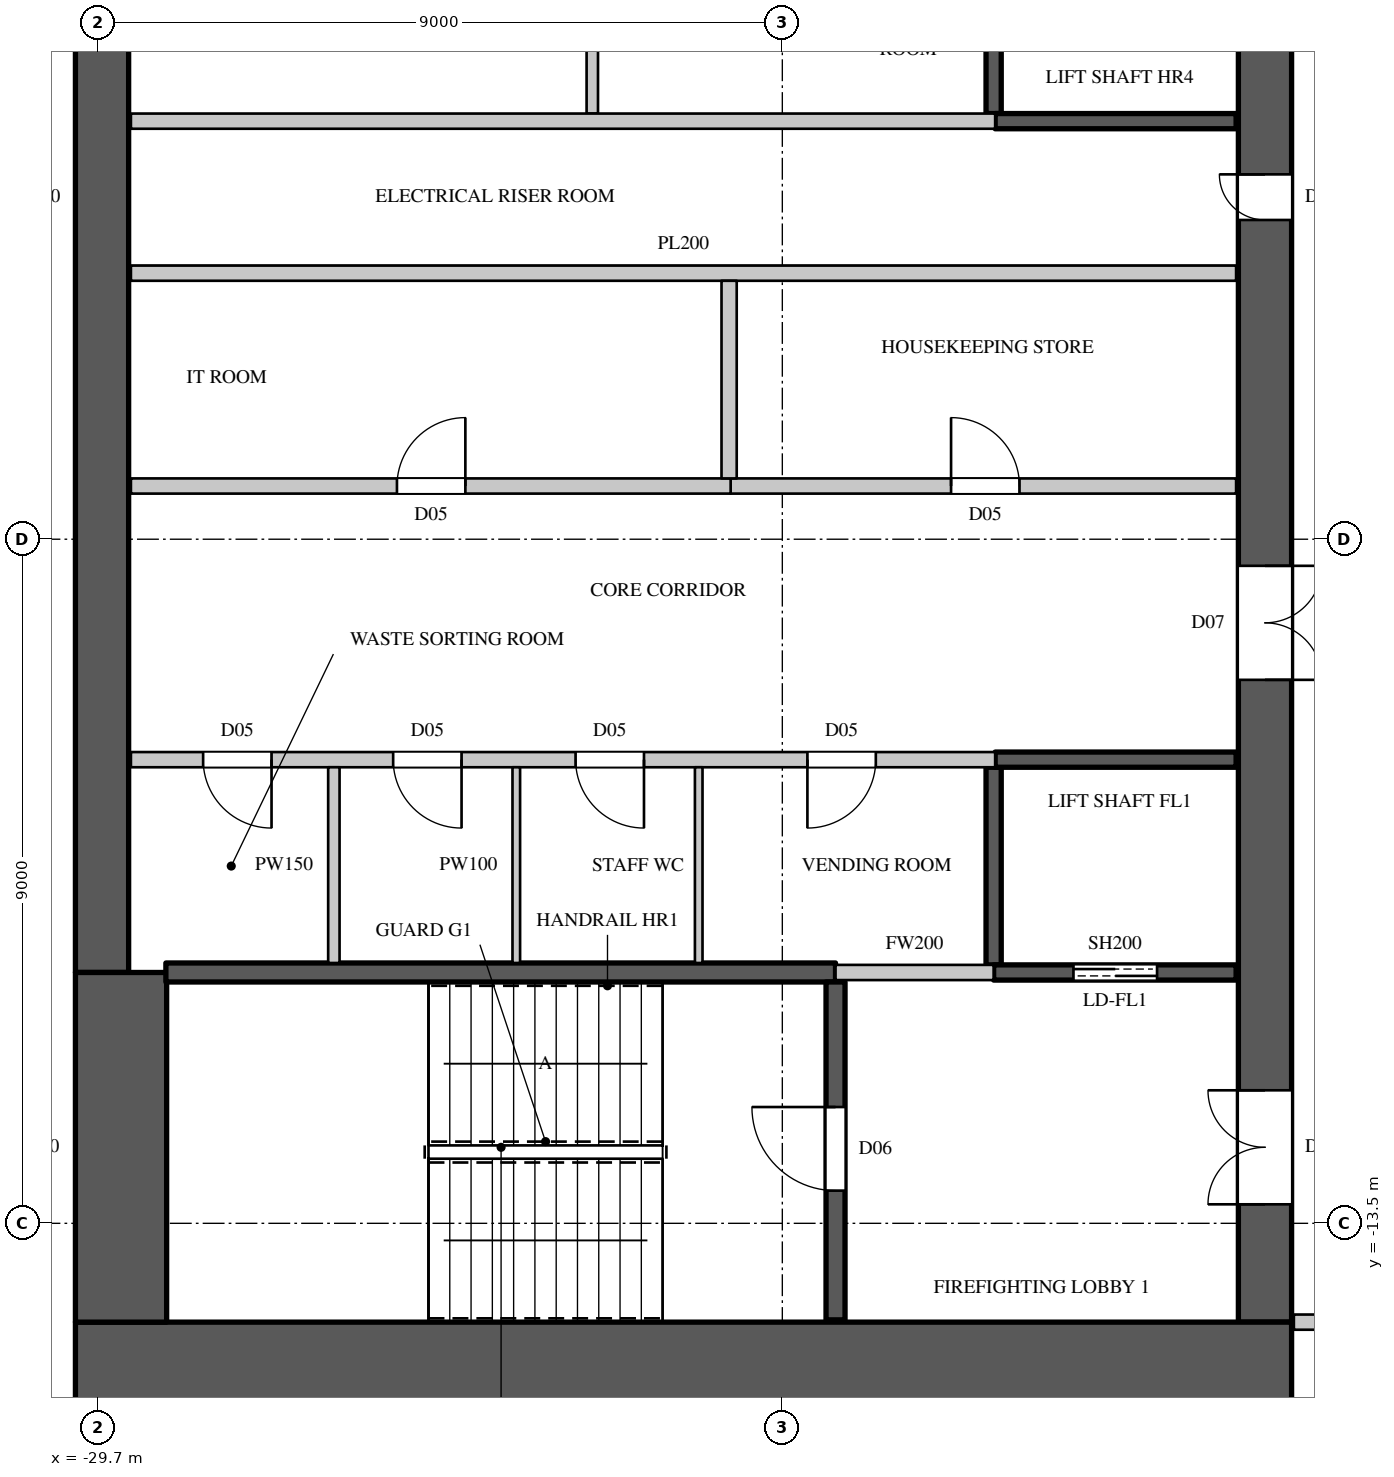
"""IFC4 building model, lengths in metres.
Left out: names, types, materials, properties, quantities, classifications, styles, units other than length and angle.
Written with IfcOpenShell. Run it as: python <this file> out.ifc"""

import sys

from ifc_helpers import new_model, si_unit, direction, frame, frame_2d, origin, place, context, subcontext, project, spatial, rectangle, extrude, element, fill, save


model = new_model("IFC4")
c1 = context("Model", 3, precision=1e-05, world=origin(), true_north=direction((0.0, 1.0)))
c2 = subcontext(c1, "Body", "Model", "MODEL_VIEW")
j1 = project(units=[si_unit("LENGTHUNIT", "METRE"), si_unit("PLANEANGLEUNIT", "RADIAN")], contexts=[c1])
p1 = place(None, origin())
s1 = spatial("IfcSite", under=j1, at=p1, CompositionType="ELEMENT")
p2 = place(p1, origin())
s2 = spatial("IfcBuilding", under=s1, at=p2, CompositionType="ELEMENT")
p3 = place(p2, frame((0.0, 0.0, 247.5)))
s3 = spatial("IfcBuildingStorey", under=s2, at=p3, CompositionType="ELEMENT", Elevation=247.5)
p4 = place(p3, frame((-30.0, -15.4, 0.0), z_axis=(0.0, 0.0, 1.0), x_axis=(1.0, 0.0, 0.0)))
e1 = element("IfcWall", 1, at=p4, inside=s3, PredefinedType="SHEAR", context=c2, shape_type="SweptSolid", body=[
    extrude(rectangle(XDim=16.0, YDim=1.2, at=frame_2d((8.0, 0.0))), origin(), (0.0, 0.0, 1.0), 4.1),
])
p5 = place(p3, frame((-14.35, -14.8, 0.0), z_axis=(0.0, 0.0, 1.0), x_axis=(0.0, 1.0, 0.0)))
e2 = element("IfcWall", 2, at=p5, inside=s3, PredefinedType="SHEAR", context=c2, shape_type="SweptSolid", body=[
    extrude(rectangle(XDim=29.6, YDim=0.7, at=frame_2d((14.8, 0.0))), origin(), (0.0, 0.0, 1.0), 4.1),
])
p6 = place(p5, frame((1.55, 0.0, 0.0)))
e3 = element("IfcOpeningElement", 3, at=p6, cuts=e2, PredefinedType="OPENING", context=c2, shape_type="SweptSolid", body=[
    extrude(rectangle(XDim=1.5, YDim=2.4, at=frame_2d((0.75, 1.2))), frame((0.0, 0.36, 0.0), z_axis=(0.0, -1.0, 0.0), x_axis=(1.0, 0.0, 0.0)), (0.0, 0.0, 1.0), 0.72),
])
p7 = place(p5, frame((26.55, 0.0, 0.0)))
e4 = element("IfcOpeningElement", 4, at=p7, cuts=e2, PredefinedType="OPENING", context=c2, shape_type="SweptSolid", body=[
    extrude(rectangle(XDim=1.5, YDim=2.4, at=frame_2d((0.75, 1.2))), frame((0.0, 0.36, 0.0), z_axis=(0.0, -1.0, 0.0), x_axis=(1.0, 0.0, 0.0)), (0.0, 0.0, 1.0), 0.72),
])
p8 = place(p5, frame((8.45, 0.0, 0.0)))
e5 = element("IfcOpeningElement", 5, at=p8, cuts=e2, PredefinedType="OPENING", context=c2, shape_type="SweptSolid", body=[
    extrude(rectangle(XDim=1.5, YDim=2.4, at=frame_2d((0.75, 1.2))), frame((0.0, 0.36, 0.0), z_axis=(0.0, -1.0, 0.0), x_axis=(1.0, 0.0, 0.0)), (0.0, 0.0, 1.0), 0.72),
])
p9 = place(p5, frame((19.65, 0.0, 0.0)))
e6 = element("IfcOpeningElement", 6, at=p9, cuts=e2, PredefinedType="OPENING", context=c2, shape_type="SweptSolid", body=[
    extrude(rectangle(XDim=1.5, YDim=2.4, at=frame_2d((0.75, 1.2))), frame((0.0, 0.36, 0.0), z_axis=(0.0, -1.0, 0.0), x_axis=(1.0, 0.0, 0.0)), (0.0, 0.0, 1.0), 0.72),
])
p10 = place(p5, frame((14.5, 0.0, 0.0)))
e7 = element("IfcOpeningElement", 7, at=p10, cuts=e2, PredefinedType="OPENING", context=c2, shape_type="SweptSolid", body=[
    extrude(rectangle(XDim=0.6, YDim=2.0, at=frame_2d((0.3, 1.0))), frame((0.0, 0.36, 0.0), z_axis=(0.0, -1.0, 0.0), x_axis=(1.0, 0.0, 0.0)), (0.0, 0.0, 1.0), 0.72),
])
p11 = place(p3, frame((-29.65, -10.2, 0.0), z_axis=(0.0, 0.0, 1.0), x_axis=(0.0, 1.0, 0.0)))
e8 = element("IfcWall", 8, at=p11, inside=s3, PredefinedType="SHEAR", context=c2, shape_type="SweptSolid", body=[
    extrude(rectangle(XDim=20.4, YDim=0.7, at=frame_2d((10.2, 0.0))), origin(), (0.0, 0.0, 1.0), 4.1),
])
p12 = place(p3, frame((-29.4, -14.8, 0.0), z_axis=(0.0, 0.0, 1.0), x_axis=(0.0, 1.0, 0.0)))
e9 = element("IfcWall", 9, at=p12, inside=s3, PredefinedType="SHEAR", context=c2, shape_type="SweptSolid", body=[
    extrude(rectangle(XDim=4.6, YDim=1.2, at=frame_2d((2.3, 0.0))), origin(), (0.0, 0.0, 1.0), 4.1),
])
p13 = place(p3, frame((-29.27, -7.4, 0.0), z_axis=(0.0, 0.0, 1.0), x_axis=(1.0, 0.0, 0.0)))
e10 = element("IfcWall", 10, at=p13, inside=s3, PredefinedType="PARTITIONING", context=c2, shape_type="SweptSolid", body=[
    extrude(rectangle(XDim=11.37, YDim=0.2, at=frame_2d((5.685, 0.0))), origin(), (0.0, 0.0, 1.0), 3.8),
])
p14 = place(p13, frame((0.95, 0.0, 0.0)))
e11 = element("IfcOpeningElement", 11, at=p14, cuts=e10, PredefinedType="OPENING", context=c2, shape_type="SweptSolid", body=[
    extrude(rectangle(XDim=0.9, YDim=2.2, at=frame_2d((0.45, 1.1))), frame((0.0, 0.11, 0.0), z_axis=(0.0, -1.0, 0.0), x_axis=(1.0, 0.0, 0.0)), (0.0, 0.0, 1.0), 0.22),
])
p15 = place(p13, frame((3.45, 0.0, 0.0)))
e12 = element("IfcOpeningElement", 12, at=p15, cuts=e10, PredefinedType="OPENING", context=c2, shape_type="SweptSolid", body=[
    extrude(rectangle(XDim=0.9, YDim=2.2, at=frame_2d((0.45, 1.1))), frame((0.0, 0.11, 0.0), z_axis=(0.0, -1.0, 0.0), x_axis=(1.0, 0.0, 0.0)), (0.0, 0.0, 1.0), 0.22),
])
p16 = place(p13, frame((5.85, 0.0, 0.0)))
e13 = element("IfcOpeningElement", 13, at=p16, cuts=e10, PredefinedType="OPENING", context=c2, shape_type="SweptSolid", body=[
    extrude(rectangle(XDim=0.9, YDim=2.2, at=frame_2d((0.45, 1.1))), frame((0.0, 0.11, 0.0), z_axis=(0.0, -1.0, 0.0), x_axis=(1.0, 0.0, 0.0)), (0.0, 0.0, 1.0), 0.22),
])
p17 = place(p13, frame((8.9, 0.0, 0.0)))
e14 = element("IfcOpeningElement", 14, at=p17, cuts=e10, PredefinedType="OPENING", context=c2, shape_type="SweptSolid", body=[
    extrude(rectangle(XDim=0.9, YDim=2.2, at=frame_2d((0.45, 1.1))), frame((0.0, 0.11, 0.0), z_axis=(0.0, -1.0, 0.0), x_axis=(1.0, 0.0, 0.0)), (0.0, 0.0, 1.0), 0.22),
])
p18 = place(p3, frame((-21.38, -3.8, 0.0), z_axis=(0.0, 0.0, 1.0), x_axis=(1.0, 0.0, 0.0)))
e15 = element("IfcWall", 15, at=p18, inside=s3, PredefinedType="PARTITIONING", context=c2, shape_type="SweptSolid", body=[
    extrude(rectangle(XDim=6.65, YDim=0.2, at=frame_2d((3.325, 0.0))), origin(), (0.0, 0.0, 1.0), 3.8),
])
p19 = place(p18, frame((2.9, 0.0, 0.0)))
e16 = element("IfcOpeningElement", 16, at=p19, cuts=e15, PredefinedType="OPENING", context=c2, shape_type="SweptSolid", body=[
    extrude(rectangle(XDim=0.9, YDim=2.2, at=frame_2d((0.45, 1.1))), frame((0.0, 0.11, 0.0), z_axis=(0.0, -1.0, 0.0), x_axis=(1.0, 0.0, 0.0)), (0.0, 0.0, 1.0), 0.22),
])
p20 = place(p3, frame((-20.0, -10.2, 0.0), z_axis=(0.0, 0.0, 1.0), x_axis=(1.0, 0.0, 0.0)))
e17 = element("IfcWall", 17, at=p20, inside=s3, PredefinedType="PARTITIONING", context=c2, shape_type="SweptSolid", body=[
    extrude(rectangle(XDim=2.08, YDim=0.2, at=frame_2d((1.04, 0.0))), origin(), (0.0, 0.0, 1.0), 3.8),
])
p21 = place(p3, frame((-13.97, -14.8, 0.0), z_axis=(0.0, 0.0, 1.0), x_axis=(1.0, 0.0, 0.0)))
e18 = element("IfcWall", 18, at=p21, inside=s3, PredefinedType="PARTITIONING", context=c2, shape_type="SweptSolid", body=[
    extrude(rectangle(XDim=2.87, YDim=0.2, at=frame_2d((1.435, 0.0))), origin(), (0.0, 0.0, 1.0), 3.8),
])
p22 = place(p3, frame((-26.6, -10.075, 0.0), z_axis=(0.0, 0.0, 1.0), x_axis=(0.0, 1.0, 0.0)))
e19 = element("IfcWall", 19, at=p22, inside=s3, PredefinedType="PARTITIONING", context=c2, shape_type="SweptSolid", body=[
    extrude(rectangle(XDim=2.575, YDim=0.15, at=frame_2d((1.288, 0.0))), origin(), (0.0, 0.0, 1.0), 3.8),
])
p23 = place(p3, frame((-23.2, 1.1, 0.0), z_axis=(0.0, 0.0, 1.0), x_axis=(0.0, 1.0, 0.0)))
e20 = element("IfcWall", 20, at=p23, inside=s3, PredefinedType="PARTITIONING", context=c2, shape_type="SweptSolid", body=[
    extrude(rectangle(XDim=2.6, YDim=0.15, at=frame_2d((1.3, 0.0))), origin(), (0.0, 0.0, 1.0), 3.8),
])
p24 = place(p3, frame((-29.27, -3.8, 0.0), z_axis=(0.0, 0.0, 1.0), x_axis=(1.0, 0.0, 0.0)))
e21 = element("IfcWall", 21, at=p24, inside=s3, PredefinedType="PARTITIONING", context=c2, shape_type="SweptSolid", body=[
    extrude(rectangle(XDim=7.89, YDim=0.2, at=frame_2d((3.945, 0.0))), origin(), (0.0, 0.0, 1.0), 3.8),
])
p25 = place(p24, frame((3.5, 0.0, 0.0)))
e22 = element("IfcOpeningElement", 22, at=p25, cuts=e21, PredefinedType="OPENING", context=c2, shape_type="SweptSolid", body=[
    extrude(rectangle(XDim=0.9, YDim=2.2, at=frame_2d((0.45, 1.1))), frame((0.0, 0.11, 0.0), z_axis=(0.0, -1.0, 0.0), x_axis=(1.0, 0.0, 0.0)), (0.0, 0.0, 1.0), 0.22),
])
p26 = place(p3, frame((-29.27, -1.0, 0.0), z_axis=(0.0, 0.0, 1.0), x_axis=(1.0, 0.0, 0.0)))
e23 = element("IfcWall", 23, at=p26, inside=s3, PredefinedType="PARTITIONING", context=c2, shape_type="SweptSolid", body=[
    extrude(rectangle(XDim=14.54, YDim=0.2, at=frame_2d((7.27, 0.0))), origin(), (0.0, 0.0, 1.0), 3.8),
])
p27 = place(p3, frame((-29.27, 1.0, 0.0), z_axis=(0.0, 0.0, 1.0), x_axis=(1.0, 0.0, 0.0)))
e24 = element("IfcWall", 24, at=p27, inside=s3, PredefinedType="PARTITIONING", context=c2, shape_type="SweptSolid", body=[
    extrude(rectangle(XDim=11.37, YDim=0.2, at=frame_2d((5.685, 0.0))), origin(), (0.0, 0.0, 1.0), 3.8),
])
p28 = place(p3, frame((-21.4, -3.7, 0.0), z_axis=(0.0, 0.0, 1.0), x_axis=(0.0, 1.0, 0.0)))
e25 = element("IfcWall", 25, at=p28, inside=s3, PredefinedType="PARTITIONING", context=c2, shape_type="SweptSolid", body=[
    extrude(rectangle(XDim=2.6, YDim=0.2, at=frame_2d((1.3, 0.0))), origin(), (0.0, 0.0, 1.0), 3.8),
])
p29 = place(p3, frame((-17.92, -10.1, 0.0), z_axis=(0.0, 0.0, 1.0), x_axis=(0.0, 1.0, 0.0)))
e26 = element("IfcWall", 26, at=p29, inside=s3, PredefinedType="SHEAR", context=c2, shape_type="SweptSolid", body=[
    extrude(rectangle(XDim=2.6, YDim=0.2, at=frame_2d((1.3, 0.0))), origin(), (0.0, 0.0, 1.0), 3.8),
])
p30 = place(p3, frame((-17.92, -10.2, 0.0), z_axis=(0.0, 0.0, 1.0), x_axis=(1.0, 0.0, 0.0)))
e27 = element("IfcWall", 27, at=p30, inside=s3, PredefinedType="SHEAR", context=c2, shape_type="SweptSolid", body=[
    extrude(rectangle(XDim=3.19, YDim=0.2, at=frame_2d((1.595, 0.0))), origin(), (0.0, 0.0, 1.0), 3.8),
])
p31 = place(p30, frame((1.05, 0.0, 0.0)))
e28 = element("IfcOpeningElement", 28, at=p31, cuts=e27, PredefinedType="OPENING", context=c2, shape_type="SweptSolid", body=[
    extrude(rectangle(XDim=1.1, YDim=2.2, at=frame_2d((0.55, 1.1))), frame((0.0, 0.11, 0.0), z_axis=(0.0, -1.0, 0.0), x_axis=(1.0, 0.0, 0.0)), (0.0, 0.0, 1.0), 0.22),
])
p32 = place(p3, frame((-17.9, -7.4, 0.0), z_axis=(0.0, 0.0, 1.0), x_axis=(1.0, 0.0, 0.0)))
e29 = element("IfcWall", 29, at=p32, inside=s3, PredefinedType="SHEAR", context=c2, shape_type="SweptSolid", body=[
    extrude(rectangle(XDim=3.17, YDim=0.2, at=frame_2d((1.585, 0.0))), origin(), (0.0, 0.0, 1.0), 3.8),
])
p33 = place(p3, frame((-17.92, 1.1, 0.0), z_axis=(0.0, 0.0, 1.0), x_axis=(0.0, 1.0, 0.0)))
e30 = element("IfcWall", 30, at=p33, inside=s3, PredefinedType="SHEAR", context=c2, shape_type="SweptSolid", body=[
    extrude(rectangle(XDim=2.6, YDim=0.2, at=frame_2d((1.3, 0.0))), origin(), (0.0, 0.0, 1.0), 3.8),
])
p34 = place(p3, frame((-17.9, 1.0, 0.0), z_axis=(0.0, 0.0, 1.0), x_axis=(1.0, 0.0, 0.0)))
e31 = element("IfcWall", 31, at=p34, inside=s3, PredefinedType="SHEAR", context=c2, shape_type="SweptSolid", body=[
    extrude(rectangle(XDim=3.17, YDim=0.2, at=frame_2d((1.585, 0.0))), origin(), (0.0, 0.0, 1.0), 3.8),
])
p35 = place(p3, frame((-28.81, -10.2, 0.0), z_axis=(0.0, 0.0, 1.0), x_axis=(1.0, 0.0, 0.0)))
e32 = element("IfcWall", 32, at=p35, inside=s3, PredefinedType="SHEAR", context=c2, shape_type="SweptSolid", body=[
    extrude(rectangle(XDim=8.81, YDim=0.25, at=frame_2d((4.405, 0.0))), origin(), (0.0, 0.0, 1.0), 3.8),
])
p36 = place(p3, frame((-20.0, -14.77, 0.0), z_axis=(0.0, 0.0, 1.0), x_axis=(0.0, 1.0, 0.0)))
e33 = element("IfcWall", 33, at=p36, inside=s3, PredefinedType="SHEAR", context=c2, shape_type="SweptSolid", body=[
    extrude(rectangle(XDim=4.445, YDim=0.25, at=frame_2d((2.223, 0.0))), origin(), (0.0, 0.0, 1.0), 3.8),
])
p37 = place(p36, frame((1.7, 0.0, 0.0)))
e34 = element("IfcOpeningElement", 34, at=p37, cuts=e33, PredefinedType="OPENING", context=c2, shape_type="SweptSolid", body=[
    extrude(rectangle(XDim=1.1, YDim=2.2, at=frame_2d((0.55, 1.1))), frame((0.0, 0.135, 0.0), z_axis=(0.0, -1.0, 0.0), x_axis=(1.0, 0.0, 0.0)), (0.0, 0.0, 1.0), 0.27),
])
for number, where, z_axis, x_axis in (
    (35, (-24.2, -10.075, 0.0), (0.0, 0.0, 1.0), (0.0, 1.0, 0.0)),
    (36, (-21.8, -10.075, 0.0), (0.0, 0.0, 1.0), (0.0, 1.0, 0.0)),
):
    element("IfcWall", number, at=place(p3, frame(where, z_axis=z_axis, x_axis=x_axis)), inside=s3, PredefinedType="PARTITIONING", context=c2, shape_type="SweptSolid", body=[
        extrude(rectangle(XDim=2.575, YDim=0.1, at=frame_2d((1.288, 0.0))), origin(), (0.0, 0.0, 1.0), 3.8),
    ])
p38 = place(p37, origin())
e37 = element("IfcDoor", 37, at=p38, inside=s3, OperationType="SINGLE_SWING_RIGHT", PredefinedType="DOOR", context=c2, shape_type="SweptSolid", body=[
    extrude(rectangle(XDim=1.1, YDim=2.2, at=frame_2d((0.55, 1.1))), frame((0.0, 0.025, 0.0), z_axis=(0.0, -1.0, 0.0), x_axis=(1.0, 0.0, 0.0)), (0.0, 0.0, 1.0), 0.05),
])
fill(e34, e37)
p39 = place(p14, origin())
e38 = element("IfcDoor", 38, at=p39, inside=s3, OperationType="SINGLE_SWING_LEFT", PredefinedType="DOOR", context=c2, shape_type="SweptSolid", body=[
    extrude(rectangle(XDim=0.9, YDim=2.2, at=frame_2d((0.45, 1.1))), frame((0.0, 0.025, 0.0), z_axis=(0.0, -1.0, 0.0), x_axis=(1.0, 0.0, 0.0)), (0.0, 0.0, 1.0), 0.05),
])
fill(e11, e38)
p40 = place(p15, origin())
e39 = element("IfcDoor", 39, at=p40, inside=s3, OperationType="SINGLE_SWING_LEFT", PredefinedType="DOOR", context=c2, shape_type="SweptSolid", body=[
    extrude(rectangle(XDim=0.9, YDim=2.2, at=frame_2d((0.45, 1.1))), frame((0.0, 0.025, 0.0), z_axis=(0.0, -1.0, 0.0), x_axis=(1.0, 0.0, 0.0)), (0.0, 0.0, 1.0), 0.05),
])
fill(e12, e39)
p41 = place(p16, origin())
e40 = element("IfcDoor", 40, at=p41, inside=s3, OperationType="SINGLE_SWING_LEFT", PredefinedType="DOOR", context=c2, shape_type="SweptSolid", body=[
    extrude(rectangle(XDim=0.9, YDim=2.2, at=frame_2d((0.45, 1.1))), frame((0.0, 0.025, 0.0), z_axis=(0.0, -1.0, 0.0), x_axis=(1.0, 0.0, 0.0)), (0.0, 0.0, 1.0), 0.05),
])
fill(e13, e40)
p42 = place(p17, origin())
e41 = element("IfcDoor", 41, at=p42, inside=s3, OperationType="SINGLE_SWING_RIGHT", PredefinedType="DOOR", context=c2, shape_type="SweptSolid", body=[
    extrude(rectangle(XDim=0.9, YDim=2.2, at=frame_2d((0.45, 1.1))), frame((0.0, 0.025, 0.0), z_axis=(0.0, -1.0, 0.0), x_axis=(1.0, 0.0, 0.0)), (0.0, 0.0, 1.0), 0.05),
])
fill(e14, e41)
p43 = place(p25, origin())
e42 = element("IfcDoor", 42, at=p43, inside=s3, OperationType="SINGLE_SWING_RIGHT", PredefinedType="DOOR", context=c2, shape_type="SweptSolid", body=[
    extrude(rectangle(XDim=0.9, YDim=2.2, at=frame_2d((0.45, 1.1))), frame((0.0, 0.025, 0.0), z_axis=(0.0, -1.0, 0.0), x_axis=(1.0, 0.0, 0.0)), (0.0, 0.0, 1.0), 0.05),
])
fill(e22, e42)
p44 = place(p19, origin())
e43 = element("IfcDoor", 43, at=p44, inside=s3, OperationType="SINGLE_SWING_LEFT", PredefinedType="DOOR", context=c2, shape_type="SweptSolid", body=[
    extrude(rectangle(XDim=0.9, YDim=2.2, at=frame_2d((0.45, 1.1))), frame((0.0, 0.025, 0.0), z_axis=(0.0, -1.0, 0.0), x_axis=(1.0, 0.0, 0.0)), (0.0, 0.0, 1.0), 0.05),
])
fill(e16, e43)
p45 = place(p31, origin())
e44 = element("IfcDoor", 44, at=p45, inside=s3, OperationType="DOUBLE_DOOR_SLIDING", PredefinedType="DOOR", context=c2, shape_type="SweptSolid", body=[
    extrude(rectangle(XDim=1.1, YDim=2.2, at=frame_2d((0.55, 1.1))), frame((0.0, 0.025, 0.0), z_axis=(0.0, -1.0, 0.0), x_axis=(1.0, 0.0, 0.0)), (0.0, 0.0, 1.0), 0.05),
])
fill(e28, e44)
p46 = place(p6, origin())
e45 = element("IfcDoor", 45, at=p46, inside=s3, OperationType="DOUBLE_DOOR_SINGLE_SWING", PredefinedType="DOOR", context=c2, shape_type="SweptSolid", body=[
    extrude(rectangle(XDim=1.5, YDim=2.4, at=frame_2d((0.75, 1.2))), frame((0.0, 0.345, 0.0), z_axis=(0.0, -1.0, 0.0), x_axis=(1.0, 0.0, 0.0)), (0.0, 0.0, 1.0), 0.05),
])
fill(e3, e45)
p47 = place(p8, origin())
e46 = element("IfcDoor", 46, at=p47, inside=s3, OperationType="DOUBLE_DOOR_SINGLE_SWING", PredefinedType="DOOR", context=c2, shape_type="SweptSolid", body=[
    extrude(rectangle(XDim=1.5, YDim=2.4, at=frame_2d((0.75, 1.2))), frame((0.0, -0.295, 0.0), z_axis=(0.0, -1.0, 0.0), x_axis=(1.0, 0.0, 0.0)), (0.0, 0.0, 1.0), 0.05),
])
fill(e5, e46)
p48 = place(p10, origin())
e47 = element("IfcDoor", 47, at=p48, inside=s3, OperationType="SINGLE_SWING_RIGHT", PredefinedType="DOOR", context=c2, shape_type="SweptSolid", body=[
    extrude(rectangle(XDim=0.6, YDim=2.0, at=frame_2d((0.3, 1.0))), frame((0.0, 0.345, 0.0), z_axis=(0.0, -1.0, 0.0), x_axis=(1.0, 0.0, 0.0)), (0.0, 0.0, 1.0), 0.05),
])
fill(e7, e47)
save(model, sys.argv[1])
